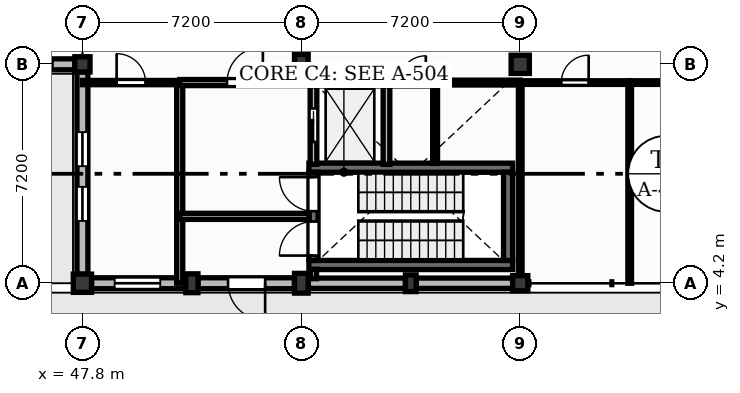
"""IFC4 building model, lengths in metres.
Left out: names, types, materials, properties, quantities, classifications, styles, units other than length and angle.
Written with IfcOpenShell. Run it as: python <this file> out.ifc"""

import sys

from ifc_helpers import new_model, si_unit, direction, frame, frame_2d, origin, origin_2d, place, context, subcontext, project, spatial, rectangle, extrude, element, fill, save


model = new_model("IFC4")
c1 = context("Model", 3, precision=1e-05, world=origin(), true_north=direction((0.0, 1.0)))
c2 = subcontext(c1, "Body", "Model", "MODEL_VIEW")
j1 = project(units=[si_unit("LENGTHUNIT", "METRE"), si_unit("PLANEANGLEUNIT", "RADIAN")], contexts=[c1])
p1 = place(None, origin())
s1 = spatial("IfcSite", under=j1, at=p1, CompositionType="ELEMENT")
p2 = place(p1, origin())
s2 = spatial("IfcBuilding", under=s1, at=p2, CompositionType="ELEMENT")
p3 = place(p2, origin())
s3 = spatial("IfcBuildingStorey", under=s2, at=p3, CompositionType="ELEMENT", Elevation=0.0)
p4 = place(p3, frame((47.8, 4.2, 0.0), z_axis=(0.0, 0.0, 1.0), x_axis=(1.0, 0.0, 0.0)))
e1 = element("IfcColumn", 1, at=p4, inside=s3, PredefinedType="COLUMN", context=c2, shape_type="SweptSolid", body=[
    extrude(rectangle(XDim=0.6, YDim=0.6, at=origin_2d()), origin(), (0.0, 0.0, 1.0), 4.2),
])
p5 = place(p3, frame((47.8, 11.4, 0.0), z_axis=(0.0, 0.0, 1.0), x_axis=(1.0, 0.0, 0.0)))
e2 = element("IfcColumn", 2, at=p5, inside=s3, PredefinedType="COLUMN", context=c2, shape_type="SweptSolid", body=[
    extrude(rectangle(XDim=0.5, YDim=0.5, at=origin_2d()), origin(), (0.0, 0.0, 1.0), 4.2),
])
for number, where, z_axis, x_axis in (
    (3, (55.0, 4.2, 0.0), (0.0, 0.0, 1.0), (1.0, 0.0, 0.0)),
    (4, (55.0, 11.4, 0.0), (0.0, 0.0, 1.0), (1.0, 0.0, 0.0)),
):
    element("IfcColumn", number, at=place(p3, frame(where, z_axis=z_axis, x_axis=x_axis)), inside=s3, PredefinedType="COLUMN", context=c2, shape_type="SweptSolid", body=[
        extrude(rectangle(XDim=0.45, YDim=0.65, at=origin_2d()), origin(), (0.0, 0.0, 1.0), 4.2),
    ])
p6 = place(p3, frame((62.2, 4.2, 0.0), z_axis=(0.0, 0.0, 1.0), x_axis=(1.0, 0.0, 0.0)))
e5 = element("IfcColumn", 5, at=p6, inside=s3, PredefinedType="COLUMN", context=c2, shape_type="SweptSolid", body=[
    extrude(rectangle(XDim=0.5, YDim=0.5, at=origin_2d()), origin(), (0.0, 0.0, 1.0), 4.2),
])
p7 = place(p3, frame((62.2, 11.4, 0.0), z_axis=(0.0, 0.0, 1.0), x_axis=(1.0, 0.0, 0.0)))
e6 = element("IfcColumn", 6, at=p7, inside=s3, PredefinedType="COLUMN", context=c2, shape_type="SweptSolid", body=[
    extrude(rectangle(XDim=0.6, YDim=0.6, at=origin_2d()), origin(), (0.0, 0.0, 1.0), 4.2),
])
p8 = place(p3, frame((51.4, 4.2, 0.0), z_axis=(0.0, 0.0, 1.0), x_axis=(1.0, 0.0, 0.0)))
e7 = element("IfcColumn", 7, at=p8, inside=s3, PredefinedType="PILASTER", context=c2, shape_type="SweptSolid", body=[
    extrude(rectangle(XDim=0.4, YDim=0.62, at=origin_2d()), origin(), (0.0, 0.0, 1.0), 4.2),
])
p9 = place(p3, frame((58.6, 4.2, 0.0), z_axis=(0.0, 0.0, 1.0), x_axis=(1.0, 0.0, 0.0)))
e8 = element("IfcColumn", 8, at=p9, inside=s3, PredefinedType="PILASTER", context=c2, shape_type="SweptSolid", body=[
    extrude(rectangle(XDim=0.35, YDim=0.55, at=origin_2d()), origin(), (0.0, 0.0, 1.0), 4.2),
])
p10 = place(p3, frame((40.9, 11.4, 0.0), z_axis=(0.0, 0.0, 1.0), x_axis=(1.0, 0.0, 0.0)))
e9 = element("IfcWall", 9, at=p10, inside=s3, PredefinedType="SOLIDWALL", context=c2, shape_type="SweptSolid", body=[
    extrude(rectangle(XDim=6.65, YDim=0.36, at=frame_2d((3.325, 0.0))), origin(), (0.0, 0.0, 1.0), 3.68),
])
p11 = place(p10, frame((2.735, 0.0, 0.0)))
e10 = element("IfcOpeningElement", 10, at=p11, cuts=e9, PredefinedType="OPENING", context=c2, shape_type="SweptSolid", body=[
    extrude(rectangle(XDim=1.18, YDim=2.2, at=frame_2d((0.59, 1.1))), frame((0.0, 0.19, 0.0), z_axis=(0.0, -1.0, 0.0), x_axis=(1.0, 0.0, 0.0)), (0.0, 0.0, 1.0), 0.38),
])
p12 = place(p10, frame((0.788, 0.0, 1.0)))
e11 = element("IfcOpeningElement", 11, at=p12, cuts=e9, PredefinedType="OPENING", context=c2, shape_type="SweptSolid", body=[
    extrude(rectangle(XDim=1.22, YDim=2.2, at=frame_2d((0.61, 1.1))), frame((0.0, 0.19, 0.0), z_axis=(0.0, -1.0, 0.0), x_axis=(1.0, 0.0, 0.0)), (0.0, 0.0, 1.0), 0.38),
])
p13 = place(p10, frame((4.577, 0.0, 1.0)))
e12 = element("IfcOpeningElement", 12, at=p13, cuts=e9, PredefinedType="OPENING", context=c2, shape_type="SweptSolid", body=[
    extrude(rectangle(XDim=1.35, YDim=2.2, at=frame_2d((0.675, 1.1))), frame((0.0, 0.19, 0.0), z_axis=(0.0, -1.0, 0.0), x_axis=(1.0, 0.0, 0.0)), (0.0, 0.0, 1.0), 0.38),
])
p14 = place(p3, frame((48.1, 4.2, 0.0), z_axis=(0.0, 0.0, 1.0), x_axis=(1.0, 0.0, 0.0)))
e13 = element("IfcWall", 13, at=p14, inside=s3, PredefinedType="SOLIDWALL", context=c2, shape_type="SweptSolid", body=[
    extrude(rectangle(XDim=3.1, YDim=0.36, at=frame_2d((1.55, 0.0))), origin(), (0.0, 0.0, 1.0), 3.68),
])
p15 = place(p14, frame((0.76, 0.0, 1.5)))
e14 = element("IfcOpeningElement", 14, at=p15, cuts=e13, PredefinedType="OPENING", context=c2, shape_type="SweptSolid", body=[
    extrude(rectangle(XDim=1.5, YDim=1.25, at=frame_2d((0.75, 0.625))), frame((0.0, 0.19, 0.0), z_axis=(0.0, -1.0, 0.0), x_axis=(1.0, 0.0, 0.0)), (0.0, 0.0, 1.0), 0.38),
])
p16 = place(p3, frame((51.6, 4.2, 0.0), z_axis=(0.0, 0.0, 1.0), x_axis=(1.0, 0.0, 0.0)))
e15 = element("IfcWall", 15, at=p16, inside=s3, PredefinedType="SOLIDWALL", context=c2, shape_type="SweptSolid", body=[
    extrude(rectangle(XDim=3.175, YDim=0.36, at=frame_2d((1.587, 0.0))), origin(), (0.0, 0.0, 1.0), 3.68),
])
p17 = place(p16, frame((0.99, 0.0, 0.0)))
e16 = element("IfcOpeningElement", 16, at=p17, cuts=e15, PredefinedType="OPENING", context=c2, shape_type="SweptSolid", body=[
    extrude(rectangle(XDim=1.22, YDim=2.2, at=frame_2d((0.61, 1.1))), frame((0.0, 0.19, 0.0), z_axis=(0.0, -1.0, 0.0), x_axis=(1.0, 0.0, 0.0)), (0.0, 0.0, 1.0), 0.38),
])
p18 = place(p3, frame((47.8, 4.5, 0.0), z_axis=(0.0, 0.0, 1.0), x_axis=(0.0, 1.0, 0.0)))
e17 = element("IfcWall", 17, at=p18, inside=s3, PredefinedType="SOLIDWALL", context=c2, shape_type="SweptSolid", body=[
    extrude(rectangle(XDim=6.65, YDim=0.36, at=frame_2d((3.325, 0.0))), origin(), (0.0, 0.0, 1.0), 3.68),
])
p19 = place(p18, frame((1.75, 0.0, 1.05)))
e18 = element("IfcOpeningElement", 18, at=p19, cuts=e17, PredefinedType="OPENING", context=c2, shape_type="SweptSolid", body=[
    extrude(rectangle(XDim=1.12, YDim=1.65, at=frame_2d((0.56, 0.825))), frame((0.0, 0.19, 0.0), z_axis=(0.0, -1.0, 0.0), x_axis=(1.0, 0.0, 0.0)), (0.0, 0.0, 1.0), 0.38),
])
p20 = place(p18, frame((3.55, 0.0, 1.05)))
e19 = element("IfcOpeningElement", 19, at=p20, cuts=e17, PredefinedType="OPENING", context=c2, shape_type="SweptSolid", body=[
    extrude(rectangle(XDim=1.12, YDim=1.65, at=frame_2d((0.56, 0.825))), frame((0.0, 0.19, 0.0), z_axis=(0.0, -1.0, 0.0), x_axis=(1.0, 0.0, 0.0)), (0.0, 0.0, 1.0), 0.38),
])
p21 = place(p3, frame((55.225, 4.2, 0.0), z_axis=(0.0, 0.0, 1.0), x_axis=(1.0, 0.0, 0.0)))
e20 = element("IfcWall", 20, at=p21, inside=s3, PredefinedType="SOLIDWALL", context=c2, shape_type="SweptSolid", body=[
    extrude(rectangle(XDim=3.2, YDim=0.34, at=frame_2d((1.6, 0.0))), origin(), (0.0, 0.0, 1.0), 3.68),
])
p22 = place(p3, frame((58.775, 4.2, 0.0), z_axis=(0.0, 0.0, 1.0), x_axis=(1.0, 0.0, 0.0)))
e21 = element("IfcWall", 21, at=p22, inside=s3, PredefinedType="SOLIDWALL", context=c2, shape_type="SweptSolid", body=[
    extrude(rectangle(XDim=3.175, YDim=0.34, at=frame_2d((1.587, 0.0))), origin(), (0.0, 0.0, 1.0), 3.68),
])
for number, where, z_axis, x_axis in (
    (22, (55.25, 4.8, 0.0), (0.0, 0.0, 1.0), (1.0, 0.0, 0.0)),
    (23, (55.25, 8.0, 0.0), (0.0, 0.0, 1.0), (1.0, 0.0, 0.0)),
):
    element("IfcWall", number, at=place(p3, frame(where, z_axis=z_axis, x_axis=x_axis)), inside=s3, PredefinedType="SHEAR", context=c2, shape_type="SweptSolid", body=[
        extrude(rectangle(XDim=6.7, YDim=0.3, at=frame_2d((3.35, 0.0))), origin(), (0.0, 0.0, 1.0), 4.25),
    ])
p23 = place(p3, frame((55.4, 4.95, 0.0), z_axis=(0.0, 0.0, 1.0), x_axis=(0.0, 1.0, 0.0)))
e24 = element("IfcWall", 24, at=p23, inside=s3, PredefinedType="SHEAR", context=c2, shape_type="SweptSolid", body=[
    extrude(rectangle(XDim=2.9, YDim=0.3, at=frame_2d((1.45, 0.0))), origin(), (0.0, 0.0, 1.0), 4.25),
])
p24 = place(p23, frame((0.16, 0.0, 0.0)))
e25 = element("IfcOpeningElement", 25, at=p24, cuts=e24, PredefinedType="OPENING", context=c2, shape_type="SweptSolid", body=[
    extrude(rectangle(XDim=1.12, YDim=2.1, at=frame_2d((0.56, 1.05))), frame((0.0, 0.16, 0.0), z_axis=(0.0, -1.0, 0.0), x_axis=(1.0, 0.0, 0.0)), (0.0, 0.0, 1.0), 0.32),
])
p25 = place(p23, frame((1.62, 0.0, 0.0)))
e26 = element("IfcOpeningElement", 26, at=p25, cuts=e24, PredefinedType="OPENING", context=c2, shape_type="SweptSolid", body=[
    extrude(rectangle(XDim=1.12, YDim=2.1, at=frame_2d((0.56, 1.05))), frame((0.0, 0.16, 0.0), z_axis=(0.0, -1.0, 0.0), x_axis=(1.0, 0.0, 0.0)), (0.0, 0.0, 1.0), 0.32),
])
p26 = place(p3, frame((61.8, 4.95, 0.0), z_axis=(0.0, 0.0, 1.0), x_axis=(0.0, 1.0, 0.0)))
e27 = element("IfcWall", 27, at=p26, inside=s3, PredefinedType="SHEAR", context=c2, shape_type="SweptSolid", body=[
    extrude(rectangle(XDim=2.9, YDim=0.3, at=frame_2d((1.45, 0.0))), origin(), (0.0, 0.0, 1.0), 4.25),
])
p27 = place(p3, frame((55.4, 10.8, 0.0), z_axis=(0.0, 0.0, 1.0), x_axis=(1.0, 0.0, 0.0)))
e28 = element("IfcWall", 28, at=p27, inside=s3, PredefinedType="SOLIDWALL", context=c2, shape_type="SweptSolid", body=[
    extrude(rectangle(XDim=2.4, YDim=0.22, at=frame_2d((1.2, 0.0))), origin(), (0.0, 0.0, 1.0), 4.25),
])
p28 = place(p3, frame((55.4, 8.11, 0.0), z_axis=(0.0, 0.0, 1.0), x_axis=(0.0, 1.0, 0.0)))
e29 = element("IfcWall", 29, at=p28, inside=s3, PredefinedType="SOLIDWALL", context=c2, shape_type="SweptSolid", body=[
    extrude(rectangle(XDim=2.58, YDim=0.22, at=frame_2d((1.29, 0.0))), origin(), (0.0, 0.0, 1.0), 4.25),
])
p29 = place(p28, frame((0.74, 0.0, 0.0)))
e30 = element("IfcOpeningElement", 30, at=p29, cuts=e29, PredefinedType="OPENING", context=c2, shape_type="SweptSolid", body=[
    extrude(rectangle(XDim=1.1, YDim=2.15, at=frame_2d((0.55, 1.075))), frame((0.0, 0.12, 0.0), z_axis=(0.0, -1.0, 0.0), x_axis=(1.0, 0.0, 0.0)), (0.0, 0.0, 1.0), 0.24),
])
p30 = place(p3, frame((57.8, 8.11, 0.0), z_axis=(0.0, 0.0, 1.0), x_axis=(0.0, 1.0, 0.0)))
e31 = element("IfcWall", 31, at=p30, inside=s3, PredefinedType="SOLIDWALL", context=c2, shape_type="SweptSolid", body=[
    extrude(rectangle(XDim=2.58, YDim=0.22, at=frame_2d((1.29, 0.0))), origin(), (0.0, 0.0, 1.0), 4.25),
])
p31 = place(p3, frame((47.8, 10.8, 0.0), z_axis=(0.0, 0.0, 1.0), x_axis=(1.0, 0.0, 0.0)))
e32 = element("IfcWall", 32, at=p31, inside=s3, PredefinedType="PARTITIONING", context=c2, shape_type="SweptSolid", body=[
    extrude(rectangle(XDim=3.2, YDim=0.14, at=frame_2d((1.6, 0.0))), origin(), (0.0, 0.0, 1.0), 4.18),
])
p32 = place(p31, frame((1.125, 0.0, 0.0)))
e33 = element("IfcOpeningElement", 33, at=p32, cuts=e32, PredefinedType="OPENING", context=c2, shape_type="SweptSolid", body=[
    extrude(rectangle(XDim=0.95, YDim=2.1, at=frame_2d((0.475, 1.05))), frame((0.0, 0.08, 0.0), z_axis=(0.0, -1.0, 0.0), x_axis=(1.0, 0.0, 0.0)), (0.0, 0.0, 1.0), 0.16),
])
p33 = place(p3, frame((51.0, 4.2, 0.0), z_axis=(0.0, 0.0, 1.0), x_axis=(0.0, 1.0, 0.0)))
e34 = element("IfcWall", 34, at=p33, inside=s3, PredefinedType="PARTITIONING", context=c2, shape_type="SweptSolid", body=[
    extrude(rectangle(XDim=2.13, YDim=0.2, at=frame_2d((1.065, 0.0))), origin(), (0.0, 0.0, 1.0), 4.18),
])
for number, where, z_axis, x_axis in (
    (35, (51.0, 6.47, 0.0), (0.0, 0.0, 1.0), (0.0, 1.0, 0.0)),
    (36, (51.0, 6.4, 0.0), (0.0, 0.0, 1.0), (1.0, 0.0, 0.0)),
):
    element("IfcWall", number, at=place(p3, frame(where, z_axis=z_axis, x_axis=x_axis)), inside=s3, PredefinedType="PARTITIONING", context=c2, shape_type="SweptSolid", body=[
        extrude(rectangle(XDim=4.26, YDim=0.2, at=frame_2d((2.13, 0.0))), origin(), (0.0, 0.0, 1.0), 4.18),
    ])
p34 = place(p3, frame((51.0, 10.8, 0.0), z_axis=(0.0, 0.0, 1.0), x_axis=(1.0, 0.0, 0.0)))
e37 = element("IfcWall", 37, at=p34, inside=s3, PredefinedType="PARTITIONING", context=c2, shape_type="SweptSolid", body=[
    extrude(rectangle(XDim=4.29, YDim=0.2, at=frame_2d((2.145, 0.0))), origin(), (0.0, 0.0, 1.0), 4.18),
])
p35 = place(p34, frame((1.555, 0.0, 0.0)))
e38 = element("IfcOpeningElement", 38, at=p35, cuts=e37, PredefinedType="OPENING", context=c2, shape_type="SweptSolid", body=[
    extrude(rectangle(XDim=1.18, YDim=2.15, at=frame_2d((0.59, 1.075))), frame((0.0, 0.11, 0.0), z_axis=(0.0, -1.0, 0.0), x_axis=(1.0, 0.0, 0.0)), (0.0, 0.0, 1.0), 0.22),
])
p36 = place(p3, frame((57.91, 10.8, 0.0), z_axis=(0.0, 0.0, 1.0), x_axis=(1.0, 0.0, 0.0)))
e39 = element("IfcWall", 39, at=p36, inside=s3, PredefinedType="SOLIDWALL", context=c2, shape_type="SweptSolid", body=[
    extrude(rectangle(XDim=1.49, YDim=0.22, at=frame_2d((0.745, 0.0))), origin(), (0.0, 0.0, 1.0), 4.18),
])
p37 = place(p36, frame((0.305, 0.0, 0.0)))
e40 = element("IfcOpeningElement", 40, at=p37, cuts=e39, PredefinedType="OPENING", context=c2, shape_type="SweptSolid", body=[
    extrude(rectangle(XDim=0.88, YDim=2.05, at=frame_2d((0.44, 1.025))), frame((0.0, 0.12, 0.0), z_axis=(0.0, -1.0, 0.0), x_axis=(1.0, 0.0, 0.0)), (0.0, 0.0, 1.0), 0.24),
])
p38 = place(p3, frame((62.2, 10.8, 0.0), z_axis=(0.0, 0.0, 1.0), x_axis=(1.0, 0.0, 0.0)))
e41 = element("IfcWall", 41, at=p38, inside=s3, PredefinedType="PLUMBINGWALL", context=c2, shape_type="SweptSolid", body=[
    extrude(rectangle(XDim=3.6, YDim=0.12, at=frame_2d((1.8, 0.0))), origin(), (0.0, 0.0, 1.0), 4.18),
])
p39 = place(p38, frame((1.35, 0.0, 0.0)))
e42 = element("IfcOpeningElement", 42, at=p39, cuts=e41, PredefinedType="OPENING", context=c2, shape_type="SweptSolid", body=[
    extrude(rectangle(XDim=0.9, YDim=2.1, at=frame_2d((0.45, 1.05))), frame((0.0, 0.07, 0.0), z_axis=(0.0, -1.0, 0.0), x_axis=(1.0, 0.0, 0.0)), (0.0, 0.0, 1.0), 0.14),
])
p40 = place(p3, frame((65.8, 4.2, 0.0), z_axis=(0.0, 0.0, 1.0), x_axis=(0.0, 1.0, 0.0)))
e43 = element("IfcWall", 43, at=p40, inside=s3, PredefinedType="PLUMBINGWALL", context=c2, shape_type="SweptSolid", body=[
    extrude(rectangle(XDim=6.53, YDim=0.12, at=frame_2d((3.265, 0.0))), origin(), (0.0, 0.0, 1.0), 4.18),
])
p41 = place(p3, frame((65.8, 10.8, 0.0), z_axis=(0.0, 0.0, 1.0), x_axis=(1.0, 0.0, 0.0)))
e44 = element("IfcWall", 44, at=p41, inside=s3, PredefinedType="PLUMBINGWALL", context=c2, shape_type="SweptSolid", body=[
    extrude(rectangle(XDim=5.995, YDim=0.12, at=frame_2d((2.998, 0.0))), origin(), (0.0, 0.0, 1.0), 4.18),
])
p42 = place(p41, frame((2.548, 0.0, 0.0)))
e45 = element("IfcOpeningElement", 45, at=p42, cuts=e44, PredefinedType="OPENING", context=c2, shape_type="SweptSolid", body=[
    extrude(rectangle(XDim=0.9, YDim=2.1, at=frame_2d((0.45, 1.05))), frame((0.0, 0.07, 0.0), z_axis=(0.0, -1.0, 0.0), x_axis=(1.0, 0.0, 0.0)), (0.0, 0.0, 1.0), 0.14),
])
p43 = place(p3, frame((59.4, 8.14, 0.0), z_axis=(0.0, 0.0, 1.0), x_axis=(0.0, 1.0, 0.0)))
e46 = element("IfcWall", 46, at=p43, inside=s3, PredefinedType="PARTITIONING", context=c2, shape_type="SweptSolid", body=[
    extrude(rectangle(XDim=2.59, YDim=0.16, at=frame_2d((1.295, 0.0))), origin(), (0.0, 0.0, 1.0), 4.18),
])
p44 = place(p3, frame((55.4, 4.35, 0.0), z_axis=(0.0, 0.0, 1.0), x_axis=(0.0, 1.0, 0.0)))
e47 = element("IfcWall", 47, at=p44, inside=s3, PredefinedType="PARTITIONING", context=c2, shape_type="SweptSolid", body=[
    extrude(rectangle(XDim=0.31, YDim=0.2, at=frame_2d((0.155, 0.0))), origin(), (0.0, 0.0, 1.0), 4.18),
])
p45 = place(p3, frame((59.4, 10.8, 0.0), z_axis=(0.0, 0.0, 1.0), x_axis=(1.0, 0.0, 0.0)))
e48 = element("IfcWall", 48, at=p45, inside=s3, PredefinedType="PARTITIONING", context=c2, shape_type="SweptSolid", body=[
    extrude(rectangle(XDim=2.8, YDim=0.16, at=frame_2d((1.4, 0.0))), origin(), (0.0, 0.0, 1.0), 4.18),
])
p46 = place(p3, frame((62.2, 4.45, 0.0), z_axis=(0.0, 0.0, 1.0), x_axis=(0.0, 1.0, 0.0)))
e49 = element("IfcWall", 49, at=p46, inside=s3, PredefinedType="PLUMBINGWALL", context=c2, shape_type="SweptSolid", body=[
    extrude(rectangle(XDim=6.28, YDim=0.12, at=frame_2d((3.14, 0.0))), origin(), (0.0, 0.0, 1.0), 3.5),
])
p47 = place(p13, origin())
e50 = element("IfcWindow", 50, at=p47, inside=s3, PartitioningType="SINGLE_PANEL", PredefinedType="WINDOW", context=c2, shape_type="SweptSolid", body=[
    extrude(rectangle(XDim=1.35, YDim=2.2, at=frame_2d((0.675, 1.1))), frame((0.0, 0.03, 0.0), z_axis=(0.0, -1.0, 0.0), x_axis=(1.0, 0.0, 0.0)), (0.0, 0.0, 1.0), 0.06),
])
fill(e12, e50)
p48 = place(p15, origin())
e51 = element("IfcWindow", 51, at=p48, inside=s3, PartitioningType="DOUBLE_PANEL_VERTICAL", PredefinedType="WINDOW", context=c2, shape_type="SweptSolid", body=[
    extrude(rectangle(XDim=1.5, YDim=1.25, at=frame_2d((0.75, 0.625))), frame((0.0, 0.03, 0.0), z_axis=(0.0, -1.0, 0.0), x_axis=(1.0, 0.0, 0.0)), (0.0, 0.0, 1.0), 0.06),
])
fill(e14, e51)
p49 = place(p17, frame((1.22, 0.0, 0.0), z_axis=(0.0, 0.0, 1.0), x_axis=(-1.0, 0.0, 0.0)))
e52 = element("IfcDoor", 52, at=p49, inside=s3, OperationType="SINGLE_SWING_LEFT", PredefinedType="DOOR", context=c2, shape_type="SweptSolid", body=[
    extrude(rectangle(XDim=1.22, YDim=2.2, at=frame_2d((0.61, 1.1))), frame((0.0, 0.025, 0.0), z_axis=(0.0, -1.0, 0.0), x_axis=(1.0, 0.0, 0.0)), (0.0, 0.0, 1.0), 0.05),
])
fill(e16, e52)
p50 = place(p19, origin())
e53 = element("IfcWindow", 53, at=p50, inside=s3, PartitioningType="SINGLE_PANEL", PredefinedType="WINDOW", context=c2, shape_type="SweptSolid", body=[
    extrude(rectangle(XDim=1.12, YDim=1.65, at=frame_2d((0.56, 0.825))), frame((0.0, 0.03, 0.0), z_axis=(0.0, -1.0, 0.0), x_axis=(1.0, 0.0, 0.0)), (0.0, 0.0, 1.0), 0.06),
])
fill(e18, e53)
p51 = place(p20, origin())
e54 = element("IfcWindow", 54, at=p51, inside=s3, PartitioningType="SINGLE_PANEL", PredefinedType="WINDOW", context=c2, shape_type="SweptSolid", body=[
    extrude(rectangle(XDim=1.12, YDim=1.65, at=frame_2d((0.56, 0.825))), frame((0.0, 0.03, 0.0), z_axis=(0.0, -1.0, 0.0), x_axis=(1.0, 0.0, 0.0)), (0.0, 0.0, 1.0), 0.06),
])
fill(e19, e54)
p52 = place(p29, origin())
e55 = element("IfcDoor", 55, at=p52, inside=s3, OperationType="SLIDING_TO_LEFT", PredefinedType="DOOR", context=c2, shape_type="SweptSolid", body=[
    extrude(rectangle(XDim=1.1, YDim=2.15, at=frame_2d((0.55, 1.075))), frame((0.0, 0.025, 0.0), z_axis=(0.0, -1.0, 0.0), x_axis=(1.0, 0.0, 0.0)), (0.0, 0.0, 1.0), 0.05),
])
fill(e30, e55)
p53 = place(p24, origin())
e56 = element("IfcDoor", 56, at=p53, inside=s3, OperationType="SINGLE_SWING_LEFT", PredefinedType="DOOR", context=c2, shape_type="SweptSolid", body=[
    extrude(rectangle(XDim=1.12, YDim=2.1, at=frame_2d((0.56, 1.05))), frame((0.0, 0.025, 0.0), z_axis=(0.0, -1.0, 0.0), x_axis=(1.0, 0.0, 0.0)), (0.0, 0.0, 1.0), 0.05),
])
fill(e25, e56)
p54 = place(p25, origin())
e57 = element("IfcDoor", 57, at=p54, inside=s3, OperationType="SINGLE_SWING_RIGHT", PredefinedType="DOOR", context=c2, shape_type="SweptSolid", body=[
    extrude(rectangle(XDim=1.12, YDim=2.1, at=frame_2d((0.56, 1.05))), frame((0.0, 0.025, 0.0), z_axis=(0.0, -1.0, 0.0), x_axis=(1.0, 0.0, 0.0)), (0.0, 0.0, 1.0), 0.05),
])
fill(e26, e57)
p55 = place(p35, origin())
e58 = element("IfcDoor", 58, at=p55, inside=s3, OperationType="SINGLE_SWING_RIGHT", PredefinedType="DOOR", context=c2, shape_type="SweptSolid", body=[
    extrude(rectangle(XDim=1.18, YDim=2.15, at=frame_2d((0.59, 1.075))), frame((0.0, 0.025, 0.0), z_axis=(0.0, -1.0, 0.0), x_axis=(1.0, 0.0, 0.0)), (0.0, 0.0, 1.0), 0.05),
])
fill(e38, e58)
p56 = place(p37, origin())
e59 = element("IfcDoor", 59, at=p56, inside=s3, OperationType="SINGLE_SWING_RIGHT", PredefinedType="DOOR", context=c2, shape_type="SweptSolid", body=[
    extrude(rectangle(XDim=0.88, YDim=2.05, at=frame_2d((0.44, 1.025))), frame((0.0, 0.025, 0.0), z_axis=(0.0, -1.0, 0.0), x_axis=(1.0, 0.0, 0.0)), (0.0, 0.0, 1.0), 0.05),
])
fill(e40, e59)
p57 = place(p39, origin())
e60 = element("IfcDoor", 60, at=p57, inside=s3, OperationType="SINGLE_SWING_RIGHT", PredefinedType="DOOR", context=c2, shape_type="SweptSolid", body=[
    extrude(rectangle(XDim=0.9, YDim=2.1, at=frame_2d((0.45, 1.05))), frame((0.0, 0.025, 0.0), z_axis=(0.0, -1.0, 0.0), x_axis=(1.0, 0.0, 0.0)), (0.0, 0.0, 1.0), 0.05),
])
fill(e42, e60)
p58 = place(p32, origin())
e61 = element("IfcDoor", 61, at=p58, inside=s3, OperationType="SINGLE_SWING_LEFT", PredefinedType="DOOR", context=c2, shape_type="SweptSolid", body=[
    extrude(rectangle(XDim=0.95, YDim=2.1, at=frame_2d((0.475, 1.05))), frame((0.0, 0.025, 0.0), z_axis=(0.0, -1.0, 0.0), x_axis=(1.0, 0.0, 0.0)), (0.0, 0.0, 1.0), 0.05),
])
fill(e33, e61)
save(model, sys.argv[1])
